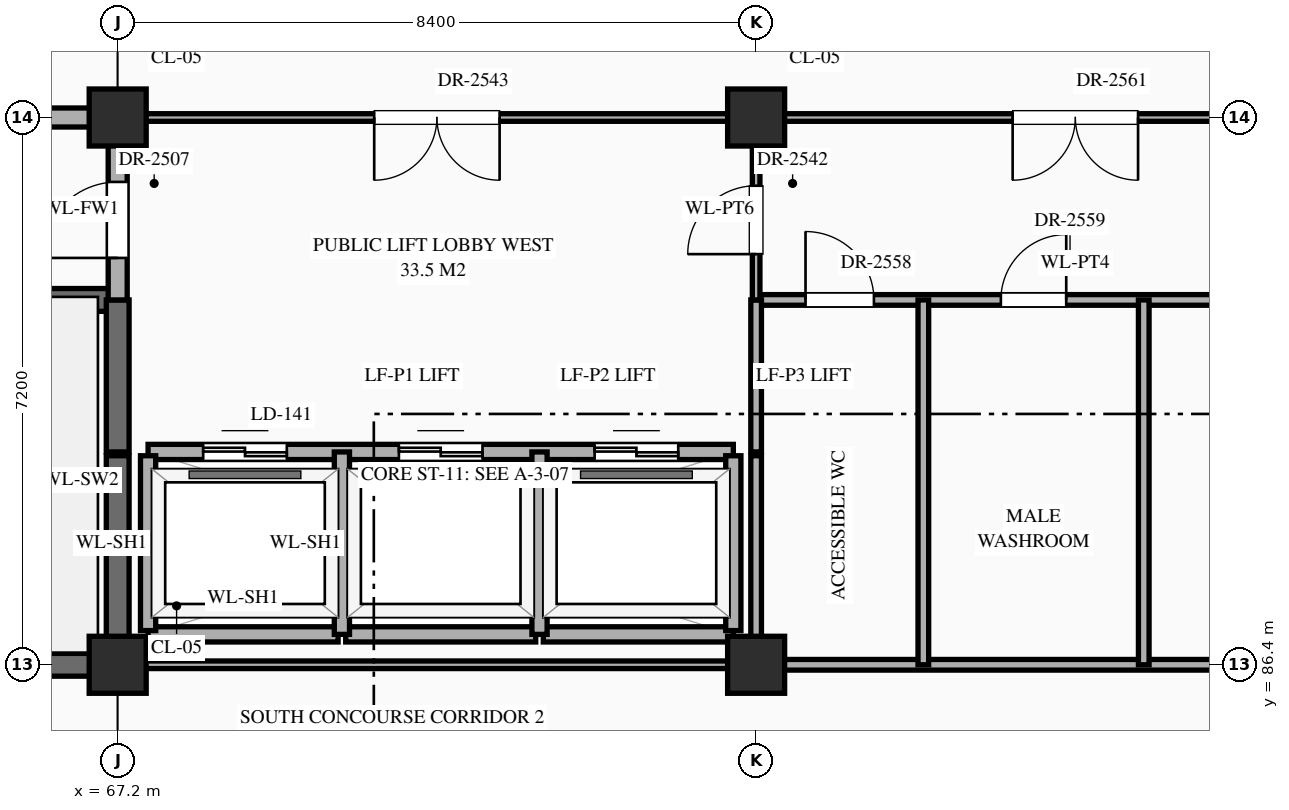
"""IFC4 building model, lengths in metres.
Left out: names, types, materials, properties, quantities, classifications, styles, units other than length and angle.
Written with IfcOpenShell. Run it as: python <this file> out.ifc"""

import sys

from ifc_helpers import new_model, si_unit, direction, frame, frame_2d, origin, origin_2d, place, context, subcontext, project, spatial, rectangle, extrude, element, fill, save


model = new_model("IFC4")
c1 = context("Model", 3, precision=1e-05, world=origin(), true_north=direction((0.0, 1.0)))
c2 = subcontext(c1, "Body", "Model", "MODEL_VIEW")
j1 = project(units=[si_unit("LENGTHUNIT", "METRE"), si_unit("PLANEANGLEUNIT", "RADIAN")], contexts=[c1])
p1 = place(None, origin())
s1 = spatial("IfcSite", under=j1, at=p1, CompositionType="ELEMENT")
p2 = place(p1, origin())
s2 = spatial("IfcBuilding", under=s1, at=p2, CompositionType="ELEMENT")
p3 = place(p2, frame((0.0, 0.0, 35.1)))
s3 = spatial("IfcBuildingStorey", under=s2, at=p3, CompositionType="ELEMENT", Elevation=35.1)
for number, where, z_axis, x_axis in (
    (1, (67.2, 86.4, 0.0), (0.0, 0.0, 1.0), (1.0, 0.0, 0.0)),
    (2, (67.2, 93.6, 0.0), (0.0, 0.0, 1.0), (1.0, 0.0, 0.0)),
    (3, (75.6, 86.4, 0.0), (0.0, 0.0, 1.0), (1.0, 0.0, 0.0)),
    (4, (75.6, 93.6, 0.0), (0.0, 0.0, 1.0), (1.0, 0.0, 0.0)),
):
    element("IfcColumn", number, at=place(p3, frame(where, z_axis=z_axis, x_axis=x_axis)), inside=s3, PredefinedType="COLUMN", context=c2, shape_type="SweptSolid", body=[
        extrude(rectangle(XDim=0.75, YDim=0.75, at=origin_2d()), origin(), (0.0, 0.0, 1.0), 4.2),
    ])
p4 = place(p3, frame((58.8, 86.4, 0.0), z_axis=(0.0, 0.0, 1.0), x_axis=(1.0, 0.0, 0.0)))
e5 = element("IfcWall", 5, at=p4, inside=s3, PredefinedType="SHEAR", context=c2, shape_type="SweptSolid", body=[
    extrude(rectangle(XDim=8.4, YDim=0.3, at=frame_2d((4.2, 0.0))), origin(), (0.0, 0.0, 1.0), 3.95),
])
p5 = place(p3, frame((67.25, 86.4, 0.0), z_axis=(0.0, 0.0, 1.0), x_axis=(1.0, 0.0, 0.0)))
e6 = element("IfcWall", 6, at=p5, inside=s3, PredefinedType="STANDARD", context=c2, shape_type="SweptSolid", body=[
    extrude(rectangle(XDim=8.3, YDim=0.1, at=frame_2d((4.15, 0.0))), origin(), (0.0, 0.0, 1.0), 3.1),
])
p6 = place(p3, frame((75.6, 86.4, 0.0), z_axis=(0.0, 0.0, 1.0), x_axis=(1.0, 0.0, 0.0)))
e7 = element("IfcWall", 7, at=p6, inside=s3, PredefinedType="STANDARD", context=c2, shape_type="SweptSolid", body=[
    extrude(rectangle(XDim=8.4, YDim=0.14, at=frame_2d((4.2, 0.0))), origin(), (0.0, 0.0, 1.0), 3.1),
])
for number, where, z_axis, x_axis in (
    (8, (67.6, 86.8, 0.0), (0.0, 0.0, 1.0), (1.0, 0.0, 0.0)),
    (9, (70.2, 86.8, 0.0), (0.0, 0.0, 1.0), (1.0, 0.0, 0.0)),
    (10, (72.8, 86.8, 0.0), (0.0, 0.0, 1.0), (1.0, 0.0, 0.0)),
):
    element("IfcWall", number, at=place(p3, frame(where, z_axis=z_axis, x_axis=x_axis)), inside=s3, PredefinedType="STANDARD", context=c2, shape_type="SweptSolid", body=[
        extrude(rectangle(XDim=2.5, YDim=0.2, at=frame_2d((1.25, 0.0))), origin(), (0.0, 0.0, 1.0), 3.95),
    ])
p7 = place(p3, frame((67.6, 89.2, 0.0), z_axis=(0.0, 0.0, 1.0), x_axis=(1.0, 0.0, 0.0)))
e11 = element("IfcWall", 11, at=p7, inside=s3, PredefinedType="STANDARD", context=c2, shape_type="SweptSolid", body=[
    extrude(rectangle(XDim=7.7, YDim=0.2, at=frame_2d((3.85, 0.0))), origin(), (0.0, 0.0, 1.0), 3.95),
])
p8 = place(p7, frame((0.725, 0.0, 0.0)))
e12 = element("IfcOpeningElement", 12, at=p8, cuts=e11, PredefinedType="OPENING", context=c2, shape_type="SweptSolid", body=[
    extrude(rectangle(XDim=1.1, YDim=2.15, at=frame_2d((0.55, 1.075))), frame((0.0, 0.112, 0.0), z_axis=(0.0, -1.0, 0.0), x_axis=(1.0, 0.0, 0.0)), (0.0, 0.0, 1.0), 0.224),
])
p9 = place(p7, frame((3.3, 0.0, 0.0)))
e13 = element("IfcOpeningElement", 13, at=p9, cuts=e11, PredefinedType="OPENING", context=c2, shape_type="SweptSolid", body=[
    extrude(rectangle(XDim=1.1, YDim=2.15, at=frame_2d((0.55, 1.075))), frame((0.0, 0.112, 0.0), z_axis=(0.0, -1.0, 0.0), x_axis=(1.0, 0.0, 0.0)), (0.0, 0.0, 1.0), 0.224),
])
p10 = place(p7, frame((5.875, 0.0, 0.0)))
e14 = element("IfcOpeningElement", 14, at=p10, cuts=e11, PredefinedType="OPENING", context=c2, shape_type="SweptSolid", body=[
    extrude(rectangle(XDim=1.1, YDim=2.15, at=frame_2d((0.55, 1.075))), frame((0.0, 0.112, 0.0), z_axis=(0.0, -1.0, 0.0), x_axis=(1.0, 0.0, 0.0)), (0.0, 0.0, 1.0), 0.224),
])
p11 = place(p3, frame((58.8, 91.2, 0.0), z_axis=(0.0, 0.0, 1.0), x_axis=(1.0, 0.0, 0.0)))
e15 = element("IfcWall", 15, at=p11, inside=s3, PredefinedType="SHEAR", context=c2, shape_type="SweptSolid", body=[
    extrude(rectangle(XDim=8.4, YDim=0.3, at=frame_2d((4.2, 0.0))), origin(), (0.0, 0.0, 1.0), 3.95),
])
p12 = place(p11, frame((0.65, 0.0, 0.0)))
e16 = element("IfcOpeningElement", 16, at=p12, cuts=e15, PredefinedType="OPENING", context=c2, shape_type="SweptSolid", body=[
    extrude(rectangle(XDim=1.1, YDim=2.2, at=frame_2d((0.55, 1.1))), frame((0.0, 0.162, 0.0), z_axis=(0.0, -1.0, 0.0), x_axis=(1.0, 0.0, 0.0)), (0.0, 0.0, 1.0), 0.324),
])
p13 = place(p3, frame((75.6, 91.2, 0.0), z_axis=(0.0, 0.0, 1.0), x_axis=(1.0, 0.0, 0.0)))
e17 = element("IfcWall", 17, at=p13, inside=s3, PredefinedType="STANDARD", context=c2, shape_type="SweptSolid", body=[
    extrude(rectangle(XDim=8.4, YDim=0.14, at=frame_2d((4.2, 0.0))), origin(), (0.0, 0.0, 1.0), 3.95),
])
p14 = place(p13, frame((0.65, 0.0, 0.0)))
e18 = element("IfcOpeningElement", 18, at=p14, cuts=e17, PredefinedType="OPENING", context=c2, shape_type="SweptSolid", body=[
    extrude(rectangle(XDim=0.9, YDim=2.15, at=frame_2d((0.45, 1.075))), frame((0.0, 0.082, 0.0), z_axis=(0.0, -1.0, 0.0), x_axis=(1.0, 0.0, 0.0)), (0.0, 0.0, 1.0), 0.164),
])
p15 = place(p13, frame((3.22, 0.0, 0.0)))
e19 = element("IfcOpeningElement", 19, at=p15, cuts=e17, PredefinedType="OPENING", context=c2, shape_type="SweptSolid", body=[
    extrude(rectangle(XDim=0.86, YDim=2.1, at=frame_2d((0.43, 1.05))), frame((0.0, 0.082, 0.0), z_axis=(0.0, -1.0, 0.0), x_axis=(1.0, 0.0, 0.0)), (0.0, 0.0, 1.0), 0.164),
])
p16 = place(p13, frame((6.32, 0.0, 0.0)))
e20 = element("IfcOpeningElement", 20, at=p16, cuts=e17, PredefinedType="OPENING", context=c2, shape_type="SweptSolid", body=[
    extrude(rectangle(XDim=0.86, YDim=2.1, at=frame_2d((0.43, 1.05))), frame((0.0, 0.082, 0.0), z_axis=(0.0, -1.0, 0.0), x_axis=(1.0, 0.0, 0.0)), (0.0, 0.0, 1.0), 0.164),
])
p17 = place(p3, frame((58.8, 93.6, 0.0), z_axis=(0.0, 0.0, 1.0), x_axis=(1.0, 0.0, 0.0)))
e21 = element("IfcWall", 21, at=p17, inside=s3, PredefinedType="STANDARD", context=c2, shape_type="SweptSolid", body=[
    extrude(rectangle(XDim=8.4, YDim=0.25, at=frame_2d((4.2, 0.0))), origin(), (0.0, 0.0, 1.0), 3.1),
])
p18 = place(p17, frame((3.4, 0.0, 0.0)))
e22 = element("IfcOpeningElement", 22, at=p18, cuts=e21, PredefinedType="OPENING", context=c2, shape_type="SweptSolid", body=[
    extrude(rectangle(XDim=1.6, YDim=2.3, at=frame_2d((0.8, 1.15))), frame((0.0, 0.137, 0.0), z_axis=(0.0, -1.0, 0.0), x_axis=(1.0, 0.0, 0.0)), (0.0, 0.0, 1.0), 0.274),
])
p19 = place(p3, frame((67.2, 93.6, 0.0), z_axis=(0.0, 0.0, 1.0), x_axis=(1.0, 0.0, 0.0)))
e23 = element("IfcWall", 23, at=p19, inside=s3, PredefinedType="STANDARD", context=c2, shape_type="SweptSolid", body=[
    extrude(rectangle(XDim=33.6, YDim=0.1, at=frame_2d((16.8, 0.0))), origin(), (0.0, 0.0, 1.0), 3.1),
])
p20 = place(p19, frame((3.375, 0.0, 0.0)))
e24 = element("IfcOpeningElement", 24, at=p20, cuts=e23, PredefinedType="OPENING", context=c2, shape_type="SweptSolid", body=[
    extrude(rectangle(XDim=1.65, YDim=2.4, at=frame_2d((0.825, 1.2))), frame((0.0, 0.062, 0.0), z_axis=(0.0, -1.0, 0.0), x_axis=(1.0, 0.0, 0.0)), (0.0, 0.0, 1.0), 0.124),
])
p21 = place(p19, frame((28.625, 0.0, 0.0)))
e25 = element("IfcOpeningElement", 25, at=p21, cuts=e23, PredefinedType="OPENING", context=c2, shape_type="SweptSolid", body=[
    extrude(rectangle(XDim=1.55, YDim=2.35, at=frame_2d((0.775, 1.175))), frame((0.0, 0.062, 0.0), z_axis=(0.0, -1.0, 0.0), x_axis=(1.0, 0.0, 0.0)), (0.0, 0.0, 1.0), 0.124),
])
p22 = place(p19, frame((11.775, 0.0, 0.0)))
e26 = element("IfcOpeningElement", 26, at=p22, cuts=e23, PredefinedType="OPENING", context=c2, shape_type="SweptSolid", body=[
    extrude(rectangle(XDim=1.65, YDim=2.4, at=frame_2d((0.825, 1.2))), frame((0.0, 0.062, 0.0), z_axis=(0.0, -1.0, 0.0), x_axis=(1.0, 0.0, 0.0)), (0.0, 0.0, 1.0), 0.124),
])
p23 = place(p19, frame((17.768, 0.0, 0.0)))
e27 = element("IfcOpeningElement", 27, at=p23, cuts=e23, PredefinedType="OPENING", context=c2, shape_type="SweptSolid", body=[
    extrude(rectangle(XDim=1.16, YDim=2.3, at=frame_2d((0.58, 1.15))), frame((0.0, 0.062, 0.0), z_axis=(0.0, -1.0, 0.0), x_axis=(1.0, 0.0, 0.0)), (0.0, 0.0, 1.0), 0.124),
])
p24 = place(p19, frame((20.4, 0.0, 0.0)))
e28 = element("IfcOpeningElement", 28, at=p24, cuts=e23, PredefinedType="OPENING", context=c2, shape_type="SweptSolid", body=[
    extrude(rectangle(XDim=1.2, YDim=2.35, at=frame_2d((0.6, 1.175))), frame((0.0, 0.062, 0.0), z_axis=(0.0, -1.0, 0.0), x_axis=(1.0, 0.0, 0.0)), (0.0, 0.0, 1.0), 0.124),
])
p25 = place(p19, frame((23.032, 0.0, 0.0)))
e29 = element("IfcOpeningElement", 29, at=p25, cuts=e23, PredefinedType="OPENING", context=c2, shape_type="SweptSolid", body=[
    extrude(rectangle(XDim=1.24, YDim=2.3, at=frame_2d((0.62, 1.15))), frame((0.0, 0.062, 0.0), z_axis=(0.0, -1.0, 0.0), x_axis=(1.0, 0.0, 0.0)), (0.0, 0.0, 1.0), 0.124),
])
p26 = place(p3, frame((67.2, 86.45, 0.0), z_axis=(0.0, 0.0, 1.0), x_axis=(0.0, 1.0, 0.0)))
e30 = element("IfcWall", 30, at=p26, inside=s3, PredefinedType="SHEAR", context=c2, shape_type="SweptSolid", body=[
    extrude(rectangle(XDim=2.7, YDim=0.3, at=frame_2d((1.35, 0.0))), origin(), (0.0, 0.0, 1.0), 3.95),
])
p27 = place(p3, frame((67.2, 89.2, 0.0), z_axis=(0.0, 0.0, 1.0), x_axis=(0.0, 1.0, 0.0)))
e31 = element("IfcWall", 31, at=p27, inside=s3, PredefinedType="SHEAR", context=c2, shape_type="SweptSolid", body=[
    extrude(rectangle(XDim=2.0, YDim=0.3, at=frame_2d((1.0, 0.0))), origin(), (0.0, 0.0, 1.0), 3.95),
])
p28 = place(p3, frame((67.2, 91.2, 0.0), z_axis=(0.0, 0.0, 1.0), x_axis=(0.0, 1.0, 0.0)))
e32 = element("IfcWall", 32, at=p28, inside=s3, PredefinedType="STANDARD", context=c2, shape_type="SweptSolid", body=[
    extrude(rectangle(XDim=2.4, YDim=0.25, at=frame_2d((1.2, 0.0))), origin(), (0.0, 0.0, 1.0), 3.2),
])
p29 = place(p28, frame((0.552, 0.0, 0.0)))
e33 = element("IfcOpeningElement", 33, at=p29, cuts=e32, PredefinedType="OPENING", context=c2, shape_type="SweptSolid", body=[
    extrude(rectangle(XDim=1.0, YDim=2.2, at=frame_2d((0.5, 1.1))), frame((0.0, 0.137, 0.0), z_axis=(0.0, -1.0, 0.0), x_axis=(1.0, 0.0, 0.0)), (0.0, 0.0, 1.0), 0.274),
])
p30 = place(p3, frame((67.6, 86.85, 0.0), z_axis=(0.0, 0.0, 1.0), x_axis=(0.0, 1.0, 0.0)))
e34 = element("IfcWall", 34, at=p30, inside=s3, PredefinedType="STANDARD", context=c2, shape_type="SweptSolid", body=[
    extrude(rectangle(XDim=2.3, YDim=0.2, at=frame_2d((1.15, 0.0))), origin(), (0.0, 0.0, 1.0), 3.95),
])
for number, where, z_axis, x_axis in (
    (35, (70.15, 86.8, 0.0), (0.0, 0.0, 1.0), (0.0, 1.0, 0.0)),
    (36, (72.75, 86.8, 0.0), (0.0, 0.0, 1.0), (0.0, 1.0, 0.0)),
):
    element("IfcWall", number, at=place(p3, frame(where, z_axis=z_axis, x_axis=x_axis)), inside=s3, PredefinedType="STANDARD", context=c2, shape_type="SweptSolid", body=[
        extrude(rectangle(XDim=2.4, YDim=0.2, at=frame_2d((1.2, 0.0))), origin(), (0.0, 0.0, 1.0), 3.95),
    ])
p31 = place(p3, frame((75.3, 86.85, 0.0), z_axis=(0.0, 0.0, 1.0), x_axis=(0.0, 1.0, 0.0)))
e37 = element("IfcWall", 37, at=p31, inside=s3, PredefinedType="STANDARD", context=c2, shape_type="SweptSolid", body=[
    extrude(rectangle(XDim=2.3, YDim=0.2, at=frame_2d((1.15, 0.0))), origin(), (0.0, 0.0, 1.0), 3.95),
])
p32 = place(p3, frame((75.6, 86.45, 0.0), z_axis=(0.0, 0.0, 1.0), x_axis=(0.0, 1.0, 0.0)))
e38 = element("IfcWall", 38, at=p32, inside=s3, PredefinedType="STANDARD", context=c2, shape_type="SweptSolid", body=[
    extrude(rectangle(XDim=2.7, YDim=0.14, at=frame_2d((1.35, 0.0))), origin(), (0.0, 0.0, 1.0), 3.2),
])
p33 = place(p3, frame((75.6, 89.2, 0.0), z_axis=(0.0, 0.0, 1.0), x_axis=(0.0, 1.0, 0.0)))
e39 = element("IfcWall", 39, at=p33, inside=s3, PredefinedType="STANDARD", context=c2, shape_type="SweptSolid", body=[
    extrude(rectangle(XDim=2.0, YDim=0.14, at=frame_2d((1.0, 0.0))), origin(), (0.0, 0.0, 1.0), 3.2),
])
p34 = place(p3, frame((75.6, 91.2, 0.0), z_axis=(0.0, 0.0, 1.0), x_axis=(0.0, 1.0, 0.0)))
e40 = element("IfcWall", 40, at=p34, inside=s3, PredefinedType="STANDARD", context=c2, shape_type="SweptSolid", body=[
    extrude(rectangle(XDim=2.4, YDim=0.1, at=frame_2d((1.2, 0.0))), origin(), (0.0, 0.0, 1.0), 3.2),
])
p35 = place(p34, frame((0.603, 0.0, 0.0)))
e41 = element("IfcOpeningElement", 41, at=p35, cuts=e40, PredefinedType="OPENING", context=c2, shape_type="SweptSolid", body=[
    extrude(rectangle(XDim=0.9, YDim=2.15, at=frame_2d((0.45, 1.075))), frame((0.0, 0.062, 0.0), z_axis=(0.0, -1.0, 0.0), x_axis=(1.0, 0.0, 0.0)), (0.0, 0.0, 1.0), 0.124),
])
for number, where, z_axis, x_axis in (
    (42, (77.8, 86.4, 0.0), (0.0, 0.0, 1.0), (0.0, 1.0, 0.0)),
    (43, (80.7, 86.4, 0.0), (0.0, 0.0, 1.0), (0.0, 1.0, 0.0)),
):
    element("IfcWall", number, at=place(p3, frame(where, z_axis=z_axis, x_axis=x_axis)), inside=s3, PredefinedType="STANDARD", context=c2, shape_type="SweptSolid", body=[
        extrude(rectangle(XDim=4.8, YDim=0.14, at=frame_2d((2.4, 0.0))), origin(), (0.0, 0.0, 1.0), 3.95),
    ])
p36 = place(p8, origin())
e44 = element("IfcDoor", 44, at=p36, inside=s3, OperationType="DOUBLE_DOOR_SLIDING", PredefinedType="DOOR", context=c2, shape_type="SweptSolid", body=[
    extrude(rectangle(XDim=1.1, YDim=2.15, at=frame_2d((0.55, 1.075))), frame((0.0, 0.025, 0.0), z_axis=(0.0, -1.0, 0.0), x_axis=(1.0, 0.0, 0.0)), (0.0, 0.0, 1.0), 0.05),
])
fill(e12, e44)
p37 = place(p9, origin())
e45 = element("IfcDoor", 45, at=p37, inside=s3, OperationType="DOUBLE_DOOR_SLIDING", PredefinedType="DOOR", context=c2, shape_type="SweptSolid", body=[
    extrude(rectangle(XDim=1.1, YDim=2.15, at=frame_2d((0.55, 1.075))), frame((0.0, 0.025, 0.0), z_axis=(0.0, -1.0, 0.0), x_axis=(1.0, 0.0, 0.0)), (0.0, 0.0, 1.0), 0.05),
])
fill(e13, e45)
p38 = place(p10, origin())
e46 = element("IfcDoor", 46, at=p38, inside=s3, OperationType="DOUBLE_DOOR_SLIDING", PredefinedType="DOOR", context=c2, shape_type="SweptSolid", body=[
    extrude(rectangle(XDim=1.1, YDim=2.15, at=frame_2d((0.55, 1.075))), frame((0.0, 0.025, 0.0), z_axis=(0.0, -1.0, 0.0), x_axis=(1.0, 0.0, 0.0)), (0.0, 0.0, 1.0), 0.05),
])
fill(e14, e46)
p39 = place(p29, origin())
e47 = element("IfcDoor", 47, at=p39, inside=s3, OperationType="SINGLE_SWING_LEFT", PredefinedType="DOOR", context=c2, shape_type="SweptSolid", body=[
    extrude(rectangle(XDim=1.0, YDim=2.2, at=frame_2d((0.5, 1.1))), frame((0.0, 0.025, 0.0), z_axis=(0.0, -1.0, 0.0), x_axis=(1.0, 0.0, 0.0)), (0.0, 0.0, 1.0), 0.05),
])
fill(e33, e47)
p40 = place(p35, origin())
e48 = element("IfcDoor", 48, at=p40, inside=s3, OperationType="SINGLE_SWING_LEFT", PredefinedType="DOOR", context=c2, shape_type="SweptSolid", body=[
    extrude(rectangle(XDim=0.9, YDim=2.15, at=frame_2d((0.45, 1.075))), frame((0.0, 0.025, 0.0), z_axis=(0.0, -1.0, 0.0), x_axis=(1.0, 0.0, 0.0)), (0.0, 0.0, 1.0), 0.05),
])
fill(e41, e48)
p41 = place(p20, frame((1.65, 0.0, 0.0), z_axis=(0.0, 0.0, 1.0), x_axis=(-1.0, 0.0, 0.0)))
e49 = element("IfcDoor", 49, at=p41, inside=s3, OperationType="DOUBLE_DOOR_SINGLE_SWING", PredefinedType="DOOR", context=c2, shape_type="SweptSolid", body=[
    extrude(rectangle(XDim=1.65, YDim=2.4, at=frame_2d((0.825, 1.2))), frame((0.0, 0.025, 0.0), z_axis=(0.0, -1.0, 0.0), x_axis=(1.0, 0.0, 0.0)), (0.0, 0.0, 1.0), 0.05),
])
fill(e24, e49)
p42 = place(p14, origin())
e50 = element("IfcDoor", 50, at=p42, inside=s3, OperationType="SINGLE_SWING_LEFT", PredefinedType="DOOR", context=c2, shape_type="SweptSolid", body=[
    extrude(rectangle(XDim=0.9, YDim=2.15, at=frame_2d((0.45, 1.075))), frame((0.0, 0.025, 0.0), z_axis=(0.0, -1.0, 0.0), x_axis=(1.0, 0.0, 0.0)), (0.0, 0.0, 1.0), 0.05),
])
fill(e18, e50)
p43 = place(p15, origin())
e51 = element("IfcDoor", 51, at=p43, inside=s3, OperationType="SINGLE_SWING_RIGHT", PredefinedType="DOOR", context=c2, shape_type="SweptSolid", body=[
    extrude(rectangle(XDim=0.86, YDim=2.1, at=frame_2d((0.43, 1.05))), frame((0.0, 0.025, 0.0), z_axis=(0.0, -1.0, 0.0), x_axis=(1.0, 0.0, 0.0)), (0.0, 0.0, 1.0), 0.05),
])
fill(e19, e51)
p44 = place(p22, frame((1.65, 0.0, 0.0), z_axis=(0.0, 0.0, 1.0), x_axis=(-1.0, 0.0, 0.0)))
e52 = element("IfcDoor", 52, at=p44, inside=s3, OperationType="DOUBLE_DOOR_SINGLE_SWING", PredefinedType="DOOR", context=c2, shape_type="SweptSolid", body=[
    extrude(rectangle(XDim=1.65, YDim=2.4, at=frame_2d((0.825, 1.2))), frame((0.0, 0.025, 0.0), z_axis=(0.0, -1.0, 0.0), x_axis=(1.0, 0.0, 0.0)), (0.0, 0.0, 1.0), 0.05),
])
fill(e26, e52)
save(model, sys.argv[1])
